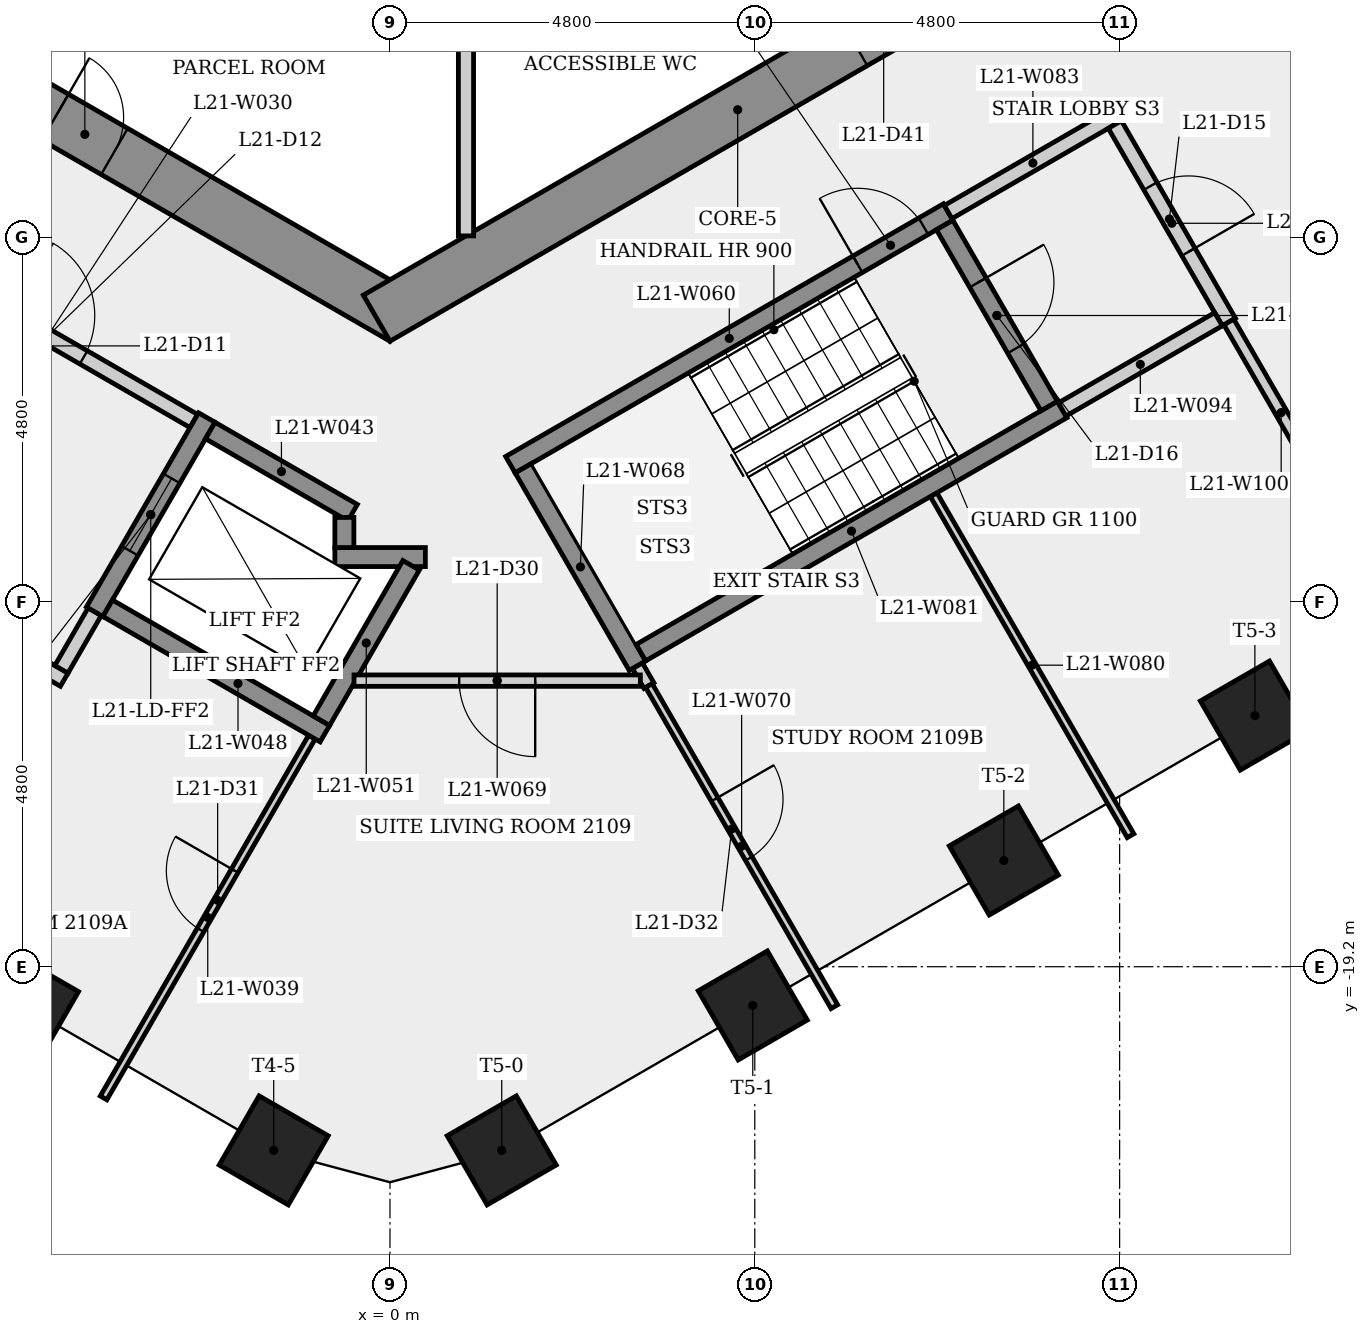
"""IFC4 building model, lengths in metres.
Left out: names, types, materials, properties, quantities, classifications, styles, units other than length and angle.
Written with IfcOpenShell. Run it as: python <this file> out.ifc"""

import sys

from ifc_helpers import new_model, si_unit, direction, frame, frame_2d, origin, origin_2d, place, context, subcontext, project, spatial, rectangle, extrude, element, fill, save


model = new_model("IFC4")
c1 = context("Model", 3, precision=1e-05, world=origin(), true_north=direction((0.0, 1.0)))
c2 = subcontext(c1, "Body", "Model", "MODEL_VIEW")
j1 = project(units=[si_unit("LENGTHUNIT", "METRE"), si_unit("PLANEANGLEUNIT", "RADIAN")], contexts=[c1])
p1 = place(None, origin())
s1 = spatial("IfcSite", under=j1, at=p1, CompositionType="ELEMENT")
p2 = place(p1, origin())
s2 = spatial("IfcBuilding", under=s1, at=p2, CompositionType="ELEMENT")
p3 = place(p2, frame((0.0, 0.0, 83.1)))
s3 = spatial("IfcBuildingStorey", under=s2, at=p3, CompositionType="ELEMENT", Elevation=83.1)
p4 = place(p3, frame((-9.325, -5.182, 0.0), z_axis=(0.0, 0.0, 1.0), x_axis=(0.866023993627, -0.500002442456, 0.0)))
e1 = element("IfcWall", 1, at=p4, inside=s3, PredefinedType="SHEAR", context=c2, shape_type="SweptSolid", body=[
    extrude(rectangle(XDim=10.97, YDim=0.7, at=frame_2d((5.485, 0.0))), origin(), (0.0, 0.0, 1.0), 3.4),
])
p5 = place(p4, frame((5.682, 0.0, 0.0)))
e2 = element("IfcOpeningElement", 2, at=p5, cuts=e1, PredefinedType="OPENING", context=c2, shape_type="SweptSolid", body=[
    extrude(rectangle(XDim=0.9, YDim=2.1, at=frame_2d((0.45, 1.05))), frame((0.0, 0.36, 0.0), z_axis=(0.0, -1.0, 0.0), x_axis=(1.0, 0.0, 0.0)), (0.0, 0.0, 1.0), 0.72),
])
p6 = place(p3, frame((-0.175, -10.667, 0.0), z_axis=(0.0, 0.0, 1.0), x_axis=(0.866023993627, 0.500002442456, 0.0)))
e3 = element("IfcWall", 3, at=p6, inside=s3, PredefinedType="SHEAR", context=c2, shape_type="SweptSolid", body=[
    extrude(rectangle(XDim=10.97, YDim=0.7, at=frame_2d((5.485, 0.0))), origin(), (0.0, 0.0, 1.0), 3.4),
])
p7 = place(p6, frame((7.252, 0.0, 0.0)))
e4 = element("IfcOpeningElement", 4, at=p7, cuts=e3, PredefinedType="OPENING", context=c2, shape_type="SweptSolid", body=[
    extrude(rectangle(XDim=0.9, YDim=2.1, at=frame_2d((0.45, 1.05))), frame((0.0, 0.36, 0.0), z_axis=(0.0, -1.0, 0.0), x_axis=(1.0, 0.0, 0.0)), (0.0, 0.0, 1.0), 0.72),
])
for number, where, z_axis, x_axis in (
    (5, (-4.815, -19.72, 0.0), (0.0, 0.0, 1.0), (-0.5, -0.866, 0.0)),
    (6, (-1.53, -21.617, 0.0), (0.0, 0.0, 1.0), (-0.5, -0.866, 0.0)),
    (7, (1.47, -21.617, 0.0), (0.0, 0.0, 1.0), (0.5, -0.866, 0.0)),
    (8, (4.773, -19.71, 0.0), (0.0, 0.0, 1.0), (0.5, -0.866, 0.0)),
    (9, (8.076, -17.803, 0.0), (0.0, 0.0, 1.0), (0.5, -0.866, 0.0)),
    (10, (11.379, -15.896, 0.0), (0.0, 0.0, 1.0), (0.5, -0.866, 0.0)),
):
    element("IfcColumn", number, at=place(p3, frame(where, z_axis=z_axis, x_axis=x_axis)), inside=s3, PredefinedType="COLUMN", context=c2, shape_type="SweptSolid", body=[
        extrude(rectangle(XDim=1.05, YDim=1.05, at=origin_2d()), origin(), (0.0, 0.0, 1.0), 3.4),
    ])
p8 = place(p3, frame((-8.356, -13.073, 0.0), z_axis=(0.0, 0.0, 1.0), x_axis=(0.866038532462, -0.499977259774, 0.0)))
e11 = element("IfcWall", 11, at=p8, inside=s3, PredefinedType="PARTITIONING", context=c2, shape_type="SweptSolid", body=[
    extrude(rectangle(XDim=4.7, YDim=0.2, at=frame_2d((2.35, 0.0))), origin(), (0.0, 0.0, 1.0), 3.05),
])
p9 = place(p3, frame((-6.435, -9.795, 0.0), z_axis=(0.0, 0.0, 1.0), x_axis=(0.866012907634, -0.500021643343, 0.0)))
e12 = element("IfcWall", 12, at=p9, inside=s3, PredefinedType="PARTITIONING", context=c2, shape_type="SweptSolid", body=[
    extrude(rectangle(XDim=4.45, YDim=0.2, at=frame_2d((2.225, 0.0))), origin(), (0.0, 0.0, 1.0), 3.05),
])
p10 = place(p9, frame((1.675, 0.0, 0.0)))
e13 = element("IfcOpeningElement", 13, at=p10, cuts=e12, PredefinedType="OPENING", context=c2, shape_type="SweptSolid", body=[
    extrude(rectangle(XDim=1.1, YDim=2.1, at=frame_2d((0.55, 1.05))), frame((0.0, 0.11, 0.0), z_axis=(0.0, -1.0, 0.0), x_axis=(1.0, 0.0, 0.0)), (0.0, 0.0, 1.0), 0.22),
])
p11 = place(p3, frame((-3.885, -14.529, 0.0), z_axis=(0.0, 0.0, 1.0), x_axis=(-0.499859285417, -0.866106630146, 0.0)))
e14 = element("IfcWall", 14, at=p11, inside=s3, PredefinedType="PARTITIONING", context=c2, shape_type="SweptSolid", body=[
    extrude(rectangle(XDim=0.875, YDim=0.2, at=frame_2d((0.438, 0.0))), origin(), (0.0, 0.0, 1.0), 3.05),
])
p12 = place(p3, frame((-3.768, -20.926, 0.0), z_axis=(0.0, 0.0, 1.0), x_axis=(0.499980760091, 0.866036511666, 0.0)))
e15 = element("IfcWall", 15, at=p12, inside=s3, PredefinedType="PARTITIONING", context=c2, shape_type="SweptSolid", body=[
    extrude(rectangle(XDim=5.482, YDim=0.1, at=frame_2d((2.741, 0.0))), origin(), (0.0, 0.0, 1.0), 3.05),
])
p13 = place(p12, frame((2.551, 0.0, 0.0)))
e16 = element("IfcOpeningElement", 16, at=p13, cuts=e15, PredefinedType="OPENING", context=c2, shape_type="SweptSolid", body=[
    extrude(rectangle(XDim=0.9, YDim=2.1, at=frame_2d((0.45, 1.05))), frame((0.0, 0.06, 0.0), z_axis=(0.0, -1.0, 0.0), x_axis=(1.0, 0.0, 0.0)), (0.0, 0.0, 1.0), 0.12),
])
p14 = place(p3, frame((-2.41, -11.974, 0.0), z_axis=(0.0, 0.0, 1.0), x_axis=(-0.500001826776, -0.866024349092, 0.0)))
e17 = element("IfcWall", 17, at=p14, inside=s3, PredefinedType="SHEAR", context=c2, shape_type="SweptSolid", body=[
    extrude(rectangle(XDim=2.95, YDim=0.25, at=frame_2d((1.475, 0.0))), origin(), (0.0, 0.0, 1.0), 3.05),
])
p15 = place(p14, frame((0.925, 0.0, 0.0)))
e18 = element("IfcOpeningElement", 18, at=p15, cuts=e17, PredefinedType="OPENING", context=c2, shape_type="SweptSolid", body=[
    extrude(rectangle(XDim=1.1, YDim=2.1, at=frame_2d((0.55, 1.05))), frame((0.0, 0.135, 0.0), z_axis=(0.0, -1.0, 0.0), x_axis=(1.0, 0.0, 0.0)), (0.0, 0.0, 1.0), 0.27),
])
p16 = place(p3, frame((-2.364, -12.145, 0.0), z_axis=(0.0, 0.0, 1.0), x_axis=(0.86603892542, -0.499976579108, 0.0)))
e19 = element("IfcWall", 19, at=p16, inside=s3, PredefinedType="SHEAR", context=c2, shape_type="SweptSolid", body=[
    extrude(rectangle(XDim=2.162, YDim=0.25, at=frame_2d((1.081, 0.0))), origin(), (0.0, 0.0, 1.0), 3.05),
])
p17 = place(p3, frame((-0.856, -16.133, 0.0), z_axis=(0.0, 0.0, 1.0), x_axis=(-0.866021716278, 0.500006386895, 0.0)))
e20 = element("IfcWall", 20, at=p17, inside=s3, PredefinedType="SHEAR", context=c2, shape_type="SweptSolid", body=[
    extrude(rectangle(XDim=3.3, YDim=0.25, at=frame_2d((1.65, 0.0))), origin(), (0.0, 0.0, 1.0), 3.05),
])
p18 = place(p3, frame((-0.725, -13.81, 0.0), z_axis=(0.0, 0.0, 1.0), x_axis=(1.0, 0.0, 0.0)))
e21 = element("IfcWall", 21, at=p18, inside=s3, PredefinedType="SHEAR", context=c2, shape_type="SweptSolid", body=[
    extrude(rectangle(XDim=1.191, YDim=0.25, at=frame_2d((0.595, 0.0))), origin(), (0.0, 0.0, 1.0), 3.05),
])
p19 = place(p3, frame((-0.6, -13.289, 0.0), z_axis=(0.0, 0.0, 1.0), x_axis=(0.0, -1.0, 0.0)))
e22 = element("IfcWall", 22, at=p19, inside=s3, PredefinedType="SHEAR", context=c2, shape_type="SweptSolid", body=[
    extrude(rectangle(XDim=0.396, YDim=0.25, at=frame_2d((0.198, 0.0))), origin(), (0.0, 0.0, 1.0), 3.4),
])
p20 = place(p3, frame((-0.902, -15.962, 0.0), z_axis=(0.0, 0.0, 1.0), x_axis=(0.49998806882, 0.866032292145, 0.0)))
e23 = element("IfcWall", 23, at=p20, inside=s3, PredefinedType="SHEAR", context=c2, shape_type="SweptSolid", body=[
    extrude(rectangle(XDim=2.36, YDim=0.25, at=frame_2d((1.18, 0.0))), origin(), (0.0, 0.0, 1.0), 3.4),
])
p21 = place(p3, frame((1.0, -5.275, 0.0), z_axis=(0.0, 0.0, 1.0), x_axis=(0.0, -1.0, 0.0)))
e24 = element("IfcWall", 24, at=p21, inside=s3, PredefinedType="PARTITIONING", context=c2, shape_type="SweptSolid", body=[
    extrude(rectangle(XDim=4.309, YDim=0.2, at=frame_2d((2.155, 0.0))), origin(), (0.0, 0.0, 1.0), 3.05),
])
p22 = place(p3, frame((1.585, -12.595, 0.0), z_axis=(0.0, 0.0, 1.0), x_axis=(0.866036417653, 0.499980922934, 0.0)))
e25 = element("IfcWall", 25, at=p22, inside=s3, PredefinedType="SHEAR", context=c2, shape_type="SweptSolid", body=[
    extrude(rectangle(XDim=6.65, YDim=0.25, at=frame_2d((3.325, 0.0))), origin(), (0.0, 0.0, 1.0), 3.05),
])
p23 = place(p22, frame((5.275, 0.0, 0.0)))
e26 = element("IfcOpeningElement", 26, at=p23, cuts=e25, PredefinedType="OPENING", context=c2, shape_type="SweptSolid", body=[
    extrude(rectangle(XDim=1.0, YDim=2.1, at=frame_2d((0.5, 1.05))), frame((0.0, 0.135, 0.0), z_axis=(0.0, -1.0, 0.0), x_axis=(1.0, 0.0, 0.0)), (0.0, 0.0, 1.0), 0.27),
])
p24 = place(p3, frame((3.256, -15.239, 0.0), z_axis=(0.0, 0.0, 1.0), x_axis=(0.49995513091, -0.866051307416, 0.0)))
e27 = element("IfcWall", 27, at=p24, inside=s3, PredefinedType="PARTITIONING", context=c2, shape_type="SweptSolid", body=[
    extrude(rectangle(XDim=0.303, YDim=0.15, at=frame_2d((0.151, 0.0))), origin(), (0.0, 0.0, 1.0), 3.05),
])
p25 = place(p3, frame((3.256, -15.239, 0.0), z_axis=(0.0, 0.0, 1.0), x_axis=(-0.50002537861, 0.866010750942, 0.0)))
e28 = element("IfcWall", 28, at=p25, inside=s3, PredefinedType="SHEAR", context=c2, shape_type="SweptSolid", body=[
    extrude(rectangle(XDim=3.0, YDim=0.25, at=frame_2d((1.5, 0.0))), origin(), (0.0, 0.0, 1.0), 3.05),
])
p26 = place(p3, frame((3.294, -15.436, 0.0), z_axis=(0.0, 0.0, 1.0), x_axis=(-1.0, 0.0, 0.0)))
e29 = element("IfcWall", 29, at=p26, inside=s3, PredefinedType="PARTITIONING", context=c2, shape_type="SweptSolid", body=[
    extrude(rectangle(XDim=3.768, YDim=0.15, at=frame_2d((1.884, 0.0))), origin(), (0.0, 0.0, 1.0), 3.05),
])
p27 = place(p26, frame((1.384, 0.0, 0.0)))
e30 = element("IfcOpeningElement", 30, at=p27, cuts=e29, PredefinedType="OPENING", context=c2, shape_type="SweptSolid", body=[
    extrude(rectangle(XDim=1.0, YDim=2.1, at=frame_2d((0.5, 1.05))), frame((0.0, 0.085, 0.0), z_axis=(0.0, -1.0, 0.0), x_axis=(1.0, 0.0, 0.0)), (0.0, 0.0, 1.0), 0.17),
])
p28 = place(p3, frame((3.407, -15.501, 0.0), z_axis=(0.0, 0.0, 1.0), x_axis=(0.499992452474, -0.866029761307, 0.0)))
e31 = element("IfcWall", 31, at=p28, inside=s3, PredefinedType="PARTITIONING", context=c2, shape_type="SweptSolid", body=[
    extrude(rectangle(XDim=4.879, YDim=0.1, at=frame_2d((2.439, 0.0))), origin(), (0.0, 0.0, 1.0), 3.05),
])
p29 = place(p28, frame((1.729, 0.0, 0.0)))
e32 = element("IfcOpeningElement", 32, at=p29, cuts=e31, PredefinedType="OPENING", context=c2, shape_type="SweptSolid", body=[
    extrude(rectangle(XDim=0.9, YDim=2.1, at=frame_2d((0.45, 1.05))), frame((0.0, 0.06, 0.0), z_axis=(0.0, -1.0, 0.0), x_axis=(1.0, 0.0, 0.0)), (0.0, 0.0, 1.0), 0.12),
])
p30 = place(p3, frame((7.153, -12.989, 0.0), z_axis=(0.0, 0.0, 1.0), x_axis=(0.499990271856, -0.866031020258, 0.0)))
e33 = element("IfcWall", 33, at=p30, inside=s3, PredefinedType="PARTITIONING", context=c2, shape_type="SweptSolid", body=[
    extrude(rectangle(XDim=5.182, YDim=0.1, at=frame_2d((2.591, 0.0))), origin(), (0.0, 0.0, 1.0), 3.05),
])
p31 = place(p3, frame((3.301, -15.068, 0.0), z_axis=(0.0, 0.0, 1.0), x_axis=(0.866035036182, 0.499983315828, 0.0)))
e34 = element("IfcWall", 34, at=p31, inside=s3, PredefinedType="SHEAR", context=c2, shape_type="SweptSolid", body=[
    extrude(rectangle(XDim=6.4, YDim=0.25, at=frame_2d((3.2, 0.0))), origin(), (0.0, 0.0, 1.0), 3.05),
])
p32 = place(p3, frame((7.298, -9.441, 0.0), z_axis=(0.0, 0.0, 1.0), x_axis=(0.500034990121, -0.866005201286, 0.0)))
e35 = element("IfcWall", 35, at=p32, inside=s3, PredefinedType="SHEAR", context=c2, shape_type="SweptSolid", body=[
    extrude(rectangle(XDim=2.75, YDim=0.25, at=frame_2d((1.375, 0.0))), origin(), (0.0, 0.0, 1.0), 3.05),
])
p33 = place(p32, frame((0.875, 0.0, 0.0)))
e36 = element("IfcOpeningElement", 36, at=p33, cuts=e35, PredefinedType="OPENING", context=c2, shape_type="SweptSolid", body=[
    extrude(rectangle(XDim=1.0, YDim=2.1, at=frame_2d((0.5, 1.05))), frame((0.0, 0.135, 0.0), z_axis=(0.0, -1.0, 0.0), x_axis=(1.0, 0.0, 0.0)), (0.0, 0.0, 1.0), 0.27),
])
p34 = place(p3, frame((7.344, -9.27, 0.0), z_axis=(0.0, 0.0, 1.0), x_axis=(0.866005588531, 0.500034319456, 0.0)))
e37 = element("IfcWall", 37, at=p34, inside=s3, PredefinedType="PARTITIONING", context=c2, shape_type="SweptSolid", body=[
    extrude(rectangle(XDim=2.575, YDim=0.2, at=frame_2d((1.288, 0.0))), origin(), (0.0, 0.0, 1.0), 3.05),
])
p35 = place(p3, frame((9.537, -8.119, 0.0), z_axis=(0.0, 0.0, 1.0), x_axis=(0.499990139034, -0.866031096941, 0.0)))
e38 = element("IfcWall", 38, at=p35, inside=s3, PredefinedType="PARTITIONING", context=c2, shape_type="SweptSolid", body=[
    extrude(rectangle(XDim=3.0, YDim=0.2, at=frame_2d((1.5, 0.0))), origin(), (0.0, 0.0, 1.0), 3.05),
])
p36 = place(p35, frame((0.935, 0.0, 0.0)))
e39 = element("IfcOpeningElement", 39, at=p36, cuts=e38, PredefinedType="OPENING", context=c2, shape_type="SweptSolid", body=[
    extrude(rectangle(XDim=1.0, YDim=2.1, at=frame_2d((0.5, 1.05))), frame((0.0, 0.11, 0.0), z_axis=(0.0, -1.0, 0.0), x_axis=(1.0, 0.0, 0.0)), (0.0, 0.0, 1.0), 0.22),
])
p37 = place(p3, frame((10.901, -10.681, 0.0), z_axis=(0.0, 0.0, 1.0), x_axis=(-0.866007538022, -0.500030943131, 0.0)))
e40 = element("IfcWall", 40, at=p37, inside=s3, PredefinedType="PARTITIONING", context=c2, shape_type="SweptSolid", body=[
    extrude(rectangle(XDim=2.375, YDim=0.2, at=frame_2d((1.188, 0.0))), origin(), (0.0, 0.0, 1.0), 3.05),
])
p38 = place(p3, frame((12.414, -13.101, 0.0), z_axis=(0.0, 0.0, 1.0), x_axis=(-0.499983500429, 0.866034929606, 0.0)))
e41 = element("IfcWall", 41, at=p38, inside=s3, PredefinedType="PARTITIONING", context=c2, shape_type="SweptSolid", body=[
    extrude(rectangle(XDim=2.752, YDim=0.15, at=frame_2d((1.376, 0.0))), origin(), (0.0, 0.0, 1.0), 3.05),
])
p39 = place(p10, origin())
e42 = element("IfcDoor", 42, at=p39, inside=s3, OperationType="SINGLE_SWING_LEFT", PredefinedType="DOOR", context=c2, shape_type="SweptSolid", body=[
    extrude(rectangle(XDim=1.1, YDim=2.1, at=frame_2d((0.55, 1.05))), frame((0.0, 0.025, 0.0), z_axis=(0.0, -1.0, 0.0), x_axis=(1.0, 0.0, 0.0)), (0.0, 0.0, 1.0), 0.05),
])
fill(e13, e42)
p40 = place(p15, origin())
e43 = element("IfcDoor", 43, at=p40, inside=s3, OperationType="SLIDING_TO_LEFT", PredefinedType="DOOR", context=c2, shape_type="SweptSolid", body=[
    extrude(rectangle(XDim=1.1, YDim=2.1, at=frame_2d((0.55, 1.05))), frame((0.0, 0.025, 0.0), z_axis=(0.0, -1.0, 0.0), x_axis=(1.0, 0.0, 0.0)), (0.0, 0.0, 1.0), 0.05),
])
fill(e18, e43)
p41 = place(p23, origin())
e44 = element("IfcDoor", 44, at=p41, inside=s3, OperationType="SINGLE_SWING_LEFT", PredefinedType="DOOR", context=c2, shape_type="SweptSolid", body=[
    extrude(rectangle(XDim=1.0, YDim=2.1, at=frame_2d((0.5, 1.05))), frame((0.0, 0.025, 0.0), z_axis=(0.0, -1.0, 0.0), x_axis=(1.0, 0.0, 0.0)), (0.0, 0.0, 1.0), 0.05),
])
fill(e26, e44)
p42 = place(p36, origin())
e45 = element("IfcDoor", 45, at=p42, inside=s3, OperationType="SINGLE_SWING_RIGHT", PredefinedType="DOOR", context=c2, shape_type="SweptSolid", body=[
    extrude(rectangle(XDim=1.0, YDim=2.1, at=frame_2d((0.5, 1.05))), frame((0.0, 0.025, 0.0), z_axis=(0.0, -1.0, 0.0), x_axis=(1.0, 0.0, 0.0)), (0.0, 0.0, 1.0), 0.05),
])
fill(e39, e45)
p43 = place(p33, origin())
e46 = element("IfcDoor", 46, at=p43, inside=s3, OperationType="SINGLE_SWING_LEFT", PredefinedType="DOOR", context=c2, shape_type="SweptSolid", body=[
    extrude(rectangle(XDim=1.0, YDim=2.1, at=frame_2d((0.5, 1.05))), frame((0.0, 0.025, 0.0), z_axis=(0.0, -1.0, 0.0), x_axis=(1.0, 0.0, 0.0)), (0.0, 0.0, 1.0), 0.05),
])
fill(e36, e46)
p44 = place(p27, origin())
e47 = element("IfcDoor", 47, at=p44, inside=s3, OperationType="SINGLE_SWING_LEFT", PredefinedType="DOOR", context=c2, shape_type="SweptSolid", body=[
    extrude(rectangle(XDim=1.0, YDim=2.1, at=frame_2d((0.5, 1.05))), frame((0.0, 0.025, 0.0), z_axis=(0.0, -1.0, 0.0), x_axis=(1.0, 0.0, 0.0)), (0.0, 0.0, 1.0), 0.05),
])
fill(e30, e47)
p45 = place(p13, origin())
e48 = element("IfcDoor", 48, at=p45, inside=s3, OperationType="SINGLE_SWING_RIGHT", PredefinedType="DOOR", context=c2, shape_type="SweptSolid", body=[
    extrude(rectangle(XDim=0.9, YDim=2.1, at=frame_2d((0.45, 1.05))), frame((0.0, 0.025, 0.0), z_axis=(0.0, -1.0, 0.0), x_axis=(1.0, 0.0, 0.0)), (0.0, 0.0, 1.0), 0.05),
])
fill(e16, e48)
p46 = place(p29, origin())
e49 = element("IfcDoor", 49, at=p46, inside=s3, OperationType="SINGLE_SWING_LEFT", PredefinedType="DOOR", context=c2, shape_type="SweptSolid", body=[
    extrude(rectangle(XDim=0.9, YDim=2.1, at=frame_2d((0.45, 1.05))), frame((0.0, 0.025, 0.0), z_axis=(0.0, -1.0, 0.0), x_axis=(1.0, 0.0, 0.0)), (0.0, 0.0, 1.0), 0.05),
])
fill(e32, e49)
p47 = place(p5, origin())
e50 = element("IfcDoor", 50, at=p47, inside=s3, OperationType="SINGLE_SWING_LEFT", PredefinedType="DOOR", context=c2, shape_type="SweptSolid", body=[
    extrude(rectangle(XDim=0.9, YDim=2.1, at=frame_2d((0.45, 1.05))), frame((0.0, 0.025, 0.0), z_axis=(0.0, -1.0, 0.0), x_axis=(1.0, 0.0, 0.0)), (0.0, 0.0, 1.0), 0.05),
])
fill(e2, e50)
save(model, sys.argv[1])
